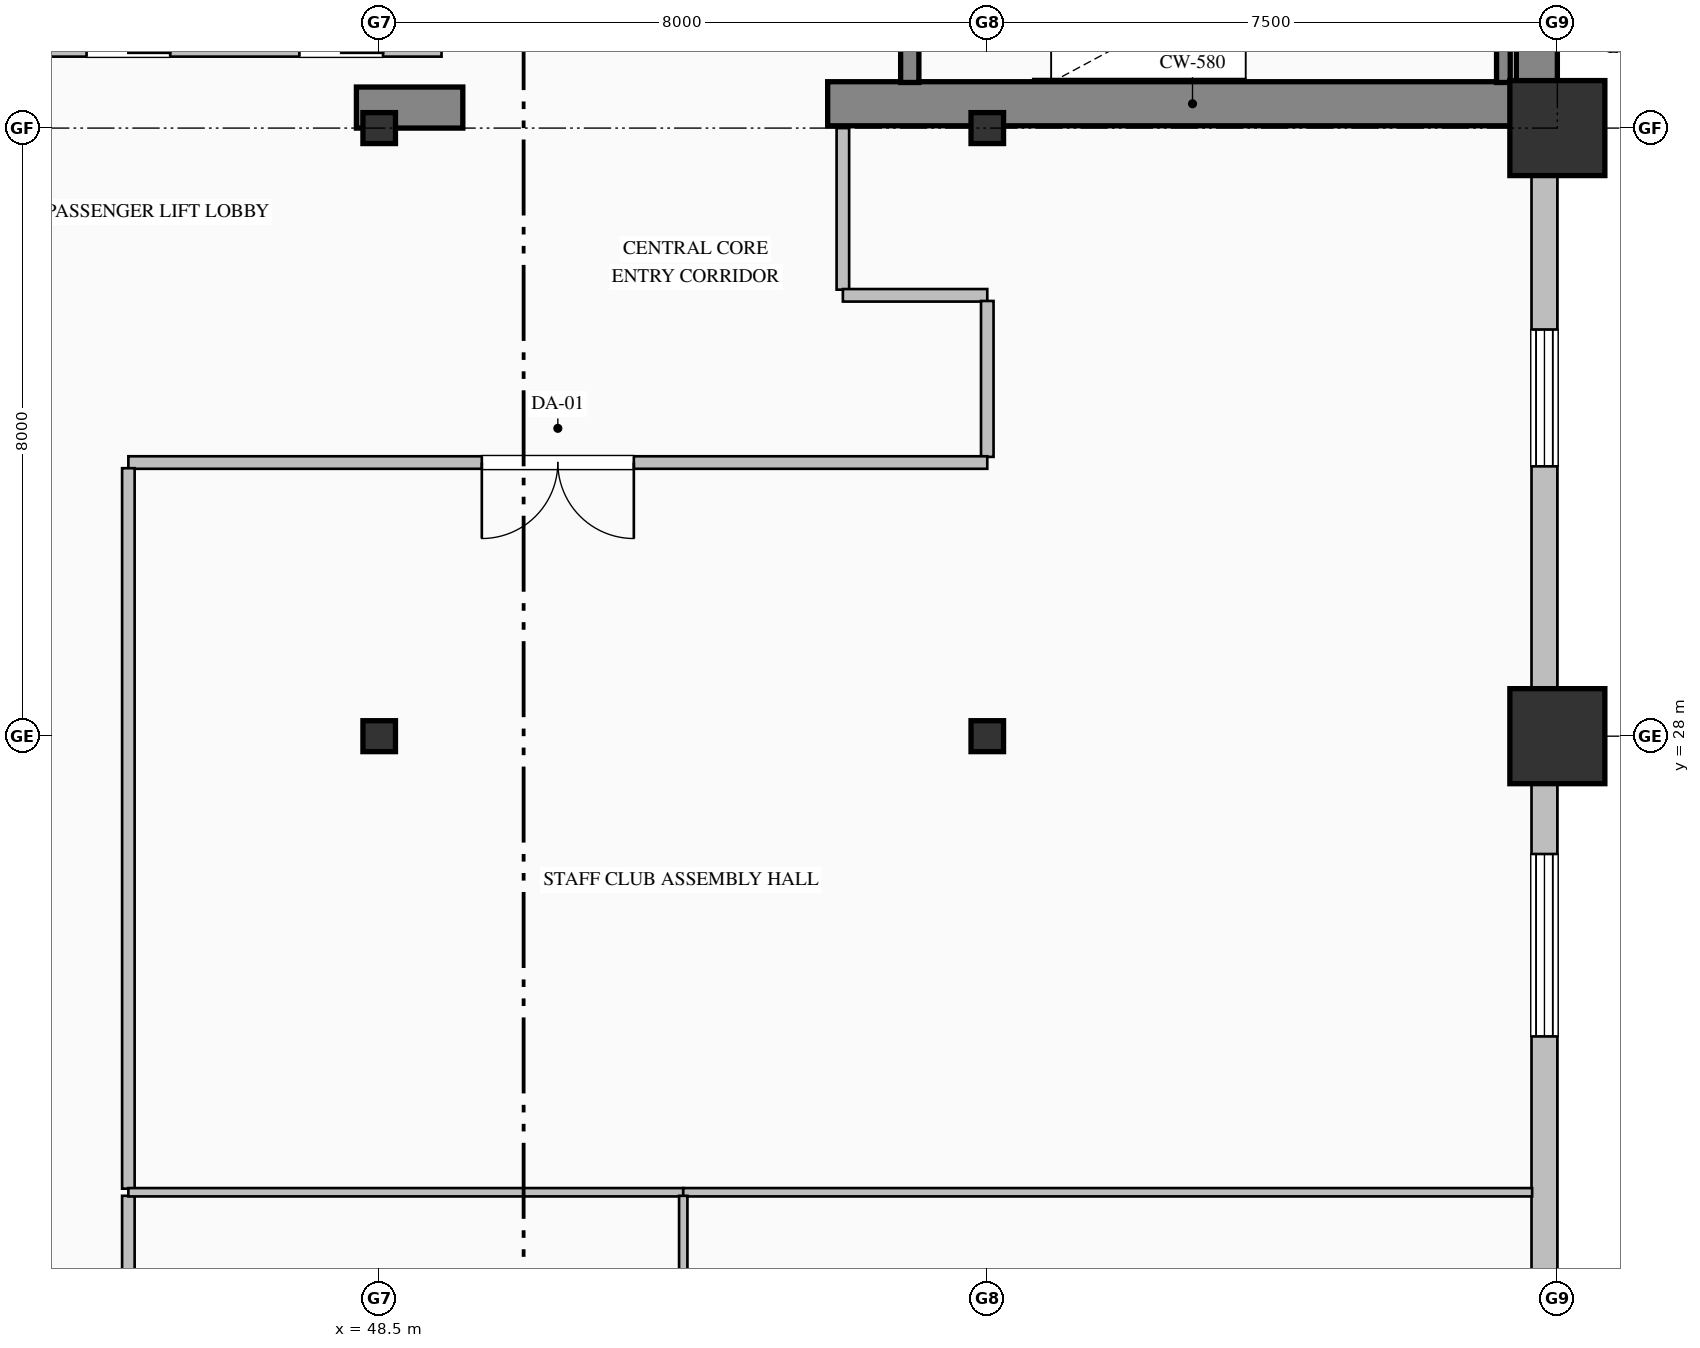
"""IFC4 building model, lengths in metres.
Left out: names, types, materials, properties, quantities, classifications, styles, units other than length and angle.
Written with IfcOpenShell. Run it as: python <this file> out.ifc"""

import sys

from ifc_helpers import new_model, si_unit, direction, frame, frame_2d, origin, origin_2d, place, context, subcontext, project, spatial, rectangle, hollow_rectangle, i_section, extrude, element, fill, save


model = new_model("IFC4")
c1 = context("Model", 3, precision=1e-05, world=origin(), true_north=direction((0.0, 1.0)))
c2 = subcontext(c1, "Body", "Model", "MODEL_VIEW")
j1 = project(units=[si_unit("LENGTHUNIT", "METRE"), si_unit("PLANEANGLEUNIT", "RADIAN")], contexts=[c1])
p1 = place(None, origin())
s1 = spatial("IfcSite", under=j1, at=p1, CompositionType="ELEMENT")
p2 = place(p1, origin())
s2 = spatial("IfcBuilding", under=s1, at=p2, CompositionType="ELEMENT")
p3 = place(p2, frame((0.0, 0.0, 64.2)))
s3 = spatial("IfcBuildingStorey", under=s2, at=p3, CompositionType="ELEMENT", Elevation=64.2)
p4 = place(p3, frame((63.73, 36.32, 0.0), z_axis=(0.0, 0.0, 1.0), x_axis=(0.0, 1.0, 0.0)))
e1 = element("IfcWall", 1, at=p4, inside=s3, PredefinedType="SHEAR", context=c2, shape_type="SweptSolid", body=[
    extrude(rectangle(XDim=15.14, YDim=0.54, at=frame_2d((7.57, 0.0))), origin(), (0.0, 0.0, 1.0), 3.75),
])
p5 = place(p3, frame((48.2, 36.27, 0.0), z_axis=(0.0, 0.0, 1.0), x_axis=(1.0, 0.0, 0.0)))
e2 = element("IfcWall", 2, at=p5, inside=s3, PredefinedType="SHEAR", context=c2, shape_type="SweptSolid", body=[
    extrude(rectangle(XDim=1.4, YDim=0.54, at=frame_2d((0.7, 0.0))), origin(), (0.0, 0.0, 1.0), 3.75),
])
p6 = place(p3, frame((54.4, 36.32, 0.0), z_axis=(0.0, 0.0, 1.0), x_axis=(1.0, 0.0, 0.0)))
e3 = element("IfcWall", 3, at=p6, inside=s3, PredefinedType="SHEAR", context=c2, shape_type="SweptSolid", body=[
    extrude(rectangle(XDim=9.6, YDim=0.58, at=frame_2d((4.8, 0.0))), origin(), (0.0, 0.0, 1.0), 4.0),
])
for number, where, z_axis, x_axis in (
    (4, (48.5, 28.0, 0.0), (0.0, 0.0, 1.0), (1.0, 0.0, 0.0)),
    (5, (48.5, 36.0, 0.0), (0.0, 0.0, 1.0), (1.0, 0.0, 0.0)),
    (6, (56.5, 28.0, 0.0), (0.0, 0.0, 1.0), (1.0, 0.0, 0.0)),
    (7, (56.5, 36.0, 0.0), (0.0, 0.0, 1.0), (1.0, 0.0, 0.0)),
):
    element("IfcColumn", number, at=place(p3, frame(where, z_axis=z_axis, x_axis=x_axis)), inside=s3, PredefinedType="COLUMN", context=c2, shape_type="SweptSolid", body=[
        extrude(i_section(OverallWidth=0.407, OverallDepth=0.428, WebThickness=0.02, FlangeThickness=0.035, FilletRadius=0.022, at=origin_2d()), origin(), (0.0, 0.0, 1.0), 4.0),
    ])
for number, where, z_axis, x_axis in (
    (8, (64.0, 28.0, 0.0), (0.0, 0.0, 1.0), (1.0, 0.0, 0.0)),
    (9, (64.0, 36.0, 0.0), (0.0, 0.0, 1.0), (1.0, 0.0, 0.0)),
):
    element("IfcColumn", number, at=place(p3, frame(where, z_axis=z_axis, x_axis=x_axis)), inside=s3, PredefinedType="COLUMN", context=c2, shape_type="SweptSolid", body=[
        extrude(hollow_rectangle(XDim=1.25, YDim=1.25, WallThickness=0.045, at=origin_2d()), origin(), (0.0, 0.0, 1.0), 4.0),
    ])
p7 = place(p3, frame((63.83, 36.05, 0.0), z_axis=(0.0, 0.0, 1.0), x_axis=(0.0, -1.0, 0.0)))
e10 = element("IfcWall", 10, at=p7, inside=s3, PredefinedType="SOLIDWALL", context=c2, shape_type="SweptSolid", body=[
    extrude(rectangle(XDim=28.05, YDim=0.34, at=frame_2d((14.025, 0.0))), origin(), (0.0, 0.0, 1.0), 3.25),
])
p8 = place(p7, frame((2.7, 0.0, 0.85)))
e11 = element("IfcOpeningElement", 11, at=p8, cuts=e10, PredefinedType="OPENING", context=c2, shape_type="SweptSolid", body=[
    extrude(rectangle(XDim=1.8, YDim=2.05, at=frame_2d((0.9, 1.025))), frame((0.0, 0.18, 0.0), z_axis=(0.0, -1.0, 0.0), x_axis=(1.0, 0.0, 0.0)), (0.0, 0.0, 1.0), 0.36),
])
p9 = place(p7, frame((9.6, 0.0, 0.8)))
e12 = element("IfcOpeningElement", 12, at=p9, cuts=e10, PredefinedType="OPENING", context=c2, shape_type="SweptSolid", body=[
    extrude(rectangle(XDim=2.4, YDim=2.15, at=frame_2d((1.2, 1.075))), frame((0.0, 0.18, 0.0), z_axis=(0.0, -1.0, 0.0), x_axis=(1.0, 0.0, 0.0)), (0.0, 0.0, 1.0), 0.36),
])
p10 = place(p3, frame((55.48, 39.75, 0.0), z_axis=(0.0, 0.0, 1.0), x_axis=(0.0, -1.0, 0.0)))
e13 = element("IfcWall", 13, at=p10, inside=s3, PredefinedType="SOLIDWALL", context=c2, shape_type="SweptSolid", body=[
    extrude(rectangle(XDim=3.15, YDim=0.24, at=frame_2d((1.575, 0.0))), origin(), (0.0, 0.0, 1.0), 4.0),
])
p11 = place(p10, frame((1.0, 0.0, 0.0)))
e14 = element("IfcOpeningElement", 14, at=p11, cuts=e13, PredefinedType="OPENING", context=c2, shape_type="SweptSolid", body=[
    extrude(rectangle(XDim=1.15, YDim=2.2, at=frame_2d((0.575, 1.1))), frame((0.0, 0.13, 0.0), z_axis=(0.0, -1.0, 0.0), x_axis=(1.0, 0.0, 0.0)), (0.0, 0.0, 1.0), 0.26),
])
p12 = place(p3, frame((63.29, 36.6, 0.0), z_axis=(0.0, 0.0, 1.0), x_axis=(0.0, 1.0, 0.0)))
e15 = element("IfcWall", 15, at=p12, inside=s3, PredefinedType="SOLIDWALL", context=c2, shape_type="SweptSolid", body=[
    extrude(rectangle(XDim=3.15, YDim=0.18, at=frame_2d((1.575, 0.0))), origin(), (0.0, 0.0, 1.0), 4.0),
])
p13 = place(p3, frame((49.32, 37.05, 0.0), z_axis=(0.0, 0.0, 1.0), x_axis=(-1.0, 0.0, 0.0)))
e16 = element("IfcWall", 16, at=p13, inside=s3, PredefinedType="PARTITIONING", context=c2, shape_type="SweptSolid", body=[
    extrude(rectangle(XDim=8.24, YDim=0.22, at=frame_2d((4.12, 0.0))), origin(), (0.0, 0.0, 1.0), 3.75),
])
p14 = place(p13, frame((6.37, 0.0, 0.0)))
e17 = element("IfcOpeningElement", 17, at=p14, cuts=e16, PredefinedType="OPENING", context=c2, shape_type="SweptSolid", body=[
    extrude(rectangle(XDim=1.1, YDim=2.2, at=frame_2d((0.55, 1.1))), frame((0.0, 0.12, 0.0), z_axis=(0.0, -1.0, 0.0), x_axis=(1.0, 0.0, 0.0)), (0.0, 0.0, 1.0), 0.24),
])
p15 = place(p13, frame((3.57, 0.0, 0.0)))
e18 = element("IfcOpeningElement", 18, at=p15, cuts=e16, PredefinedType="OPENING", context=c2, shape_type="SweptSolid", body=[
    extrude(rectangle(XDim=1.1, YDim=2.2, at=frame_2d((0.55, 1.1))), frame((0.0, 0.12, 0.0), z_axis=(0.0, -1.0, 0.0), x_axis=(1.0, 0.0, 0.0)), (0.0, 0.0, 1.0), 0.24),
])
p16 = place(p13, frame((0.77, 0.0, 0.0)))
e19 = element("IfcOpeningElement", 19, at=p16, cuts=e16, PredefinedType="OPENING", context=c2, shape_type="SweptSolid", body=[
    extrude(rectangle(XDim=1.1, YDim=2.2, at=frame_2d((0.55, 1.1))), frame((0.0, 0.12, 0.0), z_axis=(0.0, -1.0, 0.0), x_axis=(1.0, 0.0, 0.0)), (0.0, 0.0, 1.0), 0.24),
])
p17 = place(p3, frame((54.6, 36.0, 0.0), z_axis=(0.0, 0.0, 1.0), x_axis=(0.0, -1.0, 0.0)))
e20 = element("IfcWall", 20, at=p17, inside=s3, PredefinedType="PARTITIONING", context=c2, shape_type="SweptSolid", body=[
    extrude(rectangle(XDim=2.125, YDim=0.165, at=frame_2d((1.063, 0.0))), origin(), (0.0, 0.0, 1.0), 3.75),
])
p18 = place(p3, frame((54.6, 33.8, 0.0), z_axis=(0.0, 0.0, 1.0), x_axis=(1.0, 0.0, 0.0)))
e21 = element("IfcWall", 21, at=p18, inside=s3, PredefinedType="PARTITIONING", context=c2, shape_type="SweptSolid", body=[
    extrude(rectangle(XDim=1.9, YDim=0.165, at=frame_2d((0.95, 0.0))), origin(), (0.0, 0.0, 1.0), 3.75),
])
p19 = place(p3, frame((56.5, 33.726, 0.0), z_axis=(0.0, 0.0, 1.0), x_axis=(0.0, -1.0, 0.0)))
e22 = element("IfcWall", 22, at=p19, inside=s3, PredefinedType="PARTITIONING", context=c2, shape_type="SweptSolid", body=[
    extrude(rectangle(XDim=2.051, YDim=0.165, at=frame_2d((1.025, 0.0))), origin(), (0.0, 0.0, 1.0), 3.042),
])
p20 = place(p3, frame((56.5, 31.6, 0.0), z_axis=(0.0, 0.0, 1.0), x_axis=(-1.0, 0.0, 0.0)))
e23 = element("IfcWall", 23, at=p20, inside=s3, PredefinedType="PARTITIONING", context=c2, shape_type="SweptSolid", body=[
    extrude(rectangle(XDim=11.3, YDim=0.165, at=frame_2d((5.65, 0.0))), origin(), (0.0, 0.0, 1.0), 3.75),
])
p21 = place(p20, frame((4.65, 0.0, 0.0)))
e24 = element("IfcOpeningElement", 24, at=p21, cuts=e23, PredefinedType="OPENING", context=c2, shape_type="SweptSolid", body=[
    extrude(rectangle(XDim=2.0, YDim=2.4, at=frame_2d((1.0, 1.2))), frame((0.0, 0.093, 0.0), z_axis=(0.0, -1.0, 0.0), x_axis=(1.0, 0.0, 0.0)), (0.0, 0.0, 1.0), 0.185),
])
p22 = place(p3, frame((45.2, 31.525, 0.0), z_axis=(0.0, 0.0, 1.0), x_axis=(0.0, -1.0, 0.0)))
e25 = element("IfcWall", 25, at=p22, inside=s3, PredefinedType="PARTITIONING", context=c2, shape_type="SweptSolid", body=[
    extrude(rectangle(XDim=9.478, YDim=0.165, at=frame_2d((4.739, 0.0))), origin(), (0.0, 0.0, 1.0), 3.75),
])
p23 = place(p3, frame((45.2, 21.953, 0.0), z_axis=(0.0, 0.0, 1.0), x_axis=(0.0, -1.0, 0.0)))
e26 = element("IfcWall", 26, at=p23, inside=s3, PredefinedType="PARTITIONING", context=c2, shape_type="SweptSolid", body=[
    extrude(rectangle(XDim=7.178, YDim=0.165, at=frame_2d((3.589, 0.0))), origin(), (0.0, 0.0, 1.0), 3.75),
])
p24 = place(p3, frame((52.5, 22.0, 0.0), z_axis=(0.0, 0.0, 1.0), x_axis=(-1.0, 0.0, 0.0)))
e27 = element("IfcWall", 27, at=p24, inside=s3, PredefinedType="MOVABLE", context=c2, shape_type="SweptSolid", body=[
    extrude(rectangle(XDim=7.3, YDim=0.11, at=frame_2d((3.65, 0.0))), origin(), (0.0, 0.0, 1.0), 3.75),
])
p25 = place(p3, frame((63.668, 22.0, 0.0), z_axis=(0.0, 0.0, 1.0), x_axis=(-1.0, 0.0, 0.0)))
e28 = element("IfcWall", 28, at=p25, inside=s3, PredefinedType="MOVABLE", context=c2, shape_type="SweptSolid", body=[
    extrude(rectangle(XDim=11.168, YDim=0.11, at=frame_2d((5.584, 0.0))), origin(), (0.0, 0.0, 1.0), 3.75),
])
p26 = place(p3, frame((52.5, 21.953, 0.0), z_axis=(0.0, 0.0, 1.0), x_axis=(0.0, -1.0, 0.0)))
e29 = element("IfcWall", 29, at=p26, inside=s3, PredefinedType="MOVABLE", context=c2, shape_type="SweptSolid", body=[
    extrude(rectangle(XDim=7.178, YDim=0.11, at=frame_2d((3.589, 0.0))), origin(), (0.0, 0.0, 1.0), 3.75),
])
p27 = place(p8, origin())
e30 = element("IfcWindow", 30, at=p27, inside=s3, PartitioningType="TRIPLE_PANEL_VERTICAL", PredefinedType="WINDOW", context=c2, shape_type="SweptSolid", body=[
    extrude(rectangle(XDim=1.8, YDim=2.05, at=frame_2d((0.9, 1.025))), frame((0.0, 0.15, 0.0), z_axis=(0.0, -1.0, 0.0), x_axis=(1.0, 0.0, 0.0)), (0.0, 0.0, 1.0), 0.06),
])
fill(e11, e30)
p28 = place(p9, origin())
e31 = element("IfcWindow", 31, at=p28, inside=s3, PartitioningType="TRIPLE_PANEL_VERTICAL", PredefinedType="WINDOW", context=c2, shape_type="SweptSolid", body=[
    extrude(rectangle(XDim=2.4, YDim=2.15, at=frame_2d((1.2, 1.075))), frame((0.0, 0.15, 0.0), z_axis=(0.0, -1.0, 0.0), x_axis=(1.0, 0.0, 0.0)), (0.0, 0.0, 1.0), 0.06),
])
fill(e12, e31)
p29 = place(p21, origin())
e32 = element("IfcDoor", 32, at=p29, inside=s3, OperationType="DOUBLE_DOOR_SINGLE_SWING", PredefinedType="DOOR", context=c2, shape_type="SweptSolid", body=[
    extrude(rectangle(XDim=2.0, YDim=2.4, at=frame_2d((1.0, 1.2))), frame((0.0, 0.025, 0.0), z_axis=(0.0, -1.0, 0.0), x_axis=(1.0, 0.0, 0.0)), (0.0, 0.0, 1.0), 0.05),
])
fill(e24, e32)
save(model, sys.argv[1])
